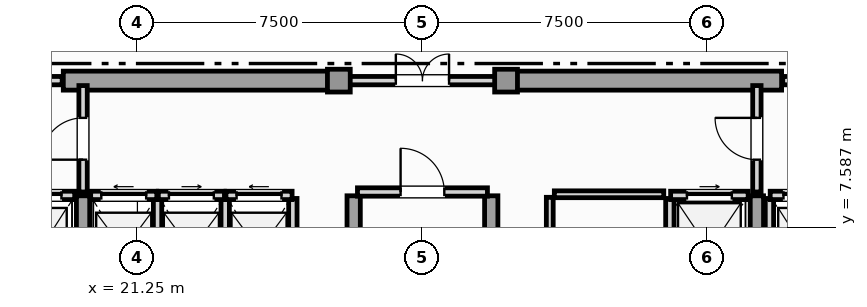
"""IFC4 building model, lengths in metres.
Left out: names, types, materials, properties, quantities, classifications, styles, units other than length and angle.
Written with IfcOpenShell. Run it as: python <this file> out.ifc"""

import sys

from ifc_helpers import new_model, si_unit, direction, frame, frame_2d, origin, origin_2d, place, context, subcontext, project, spatial, rectangle, extrude, element, fill, save


model = new_model("IFC4")
c1 = context("Model", 3, precision=1e-05, world=origin(), true_north=direction((0.0, 1.0)))
c2 = subcontext(c1, "Body", "Model", "MODEL_VIEW")
j1 = project(units=[si_unit("LENGTHUNIT", "METRE"), si_unit("PLANEANGLEUNIT", "RADIAN")], contexts=[c1])
p1 = place(None, origin())
s1 = spatial("IfcSite", under=j1, at=p1, CompositionType="ELEMENT")
p2 = place(p1, origin())
s2 = spatial("IfcBuilding", under=s1, at=p2, CompositionType="ELEMENT")
p3 = place(p2, frame((0.0, 0.0, 313.05)))
s3 = spatial("IfcBuildingStorey", under=s2, at=p3, CompositionType="ELEMENT", Elevation=313.05)
for number, where, z_axis, x_axis in (
    (1, (19.3, 11.45, 0.0), (0.0, 0.0, 1.0), (1.0, 0.0, 0.0)),
    (2, (30.9, 11.45, 0.0), (0.0, 0.0, 1.0), (1.0, 0.0, 0.0)),
):
    element("IfcWall", number, at=place(p3, frame(where, z_axis=z_axis, x_axis=x_axis)), inside=s3, PredefinedType="SHEAR", context=c2, shape_type="SweptSolid", body=[
        extrude(rectangle(XDim=7.3, YDim=0.5, at=frame_2d((3.65, 0.0))), origin(), (0.0, 0.0, 1.0), 3.65),
    ])
for number, where, z_axis, x_axis in (
    (3, (19.82, 0.92, 0.0), (0.0, 0.0, 1.0), (0.0, 1.0, 0.0)),
    (4, (26.94, 0.92, 0.0), (0.0, 0.0, 1.0), (0.0, 1.0, 0.0)),
    (5, (30.56, 0.92, 0.0), (0.0, 0.0, 1.0), (0.0, 1.0, 0.0)),
    (6, (37.55, 0.92, 0.0), (0.0, 0.0, 1.0), (0.0, 1.0, 0.0)),
):
    element("IfcWall", number, at=place(p3, frame(where, z_axis=z_axis, x_axis=x_axis)), inside=s3, PredefinedType="SHEAR", context=c2, shape_type="SweptSolid", body=[
        extrude(rectangle(XDim=7.5, YDim=0.35, at=frame_2d((3.75, 0.0))), origin(), (0.0, 0.0, 1.0), 3.65),
    ])
for number, where, z_axis, x_axis in (
    (7, (26.55, 11.45, 0.0), (0.0, 0.0, 1.0), (1.0, 0.0, 0.0)),
    (8, (30.95, 11.45, 0.0), (0.0, 0.0, 1.0), (1.0, 0.0, 0.0)),
):
    element("IfcColumn", number, at=place(p3, frame(where, z_axis=z_axis, x_axis=x_axis)), inside=s3, PredefinedType="COLUMN", context=c2, shape_type="SweptSolid", body=[
        extrude(rectangle(XDim=0.6, YDim=0.6, at=origin_2d()), origin(), (0.0, 0.0, 1.0), 3.85),
    ])
p4 = place(p3, frame((17.78, 8.43, 0.0), z_axis=(0.0, 0.0, 1.0), x_axis=(1.0, 0.0, 0.0)))
e9 = element("IfcWall", 9, at=p4, inside=s3, PredefinedType="SOLIDWALL", context=c2, shape_type="SweptSolid", body=[
    extrude(rectangle(XDim=1.82, YDim=0.22, at=frame_2d((0.91, 0.0))), origin(), (0.0, 0.0, 1.0), 3.65),
])
p5 = place(p4, frame((0.35, 0.0, 0.0)))
e10 = element("IfcOpeningElement", 10, at=p5, cuts=e9, PredefinedType="OPENING", context=c2, shape_type="SweptSolid", body=[
    extrude(rectangle(XDim=1.12, YDim=2.25, at=frame_2d((0.56, 1.125))), frame((0.0, 0.12, 0.0), z_axis=(0.0, -1.0, 0.0), x_axis=(1.0, 0.0, 0.0)), (0.0, 0.0, 1.0), 0.24),
])
p6 = place(p3, frame((37.88, 5.65, 0.0), z_axis=(0.0, 0.0, 1.0), x_axis=(0.0, 1.0, 0.0)))
e11 = element("IfcWall", 11, at=p6, inside=s3, PredefinedType="SOLIDWALL", context=c2, shape_type="SweptSolid", body=[
    extrude(rectangle(XDim=2.7, YDim=0.22, at=frame_2d((1.35, 0.0))), origin(), (0.0, 0.0, 1.0), 3.65),
])
p7 = place(p3, frame((37.9, 8.43, 0.0), z_axis=(0.0, 0.0, 1.0), x_axis=(1.0, 0.0, 0.0)))
e12 = element("IfcWall", 12, at=p7, inside=s3, PredefinedType="SOLIDWALL", context=c2, shape_type="SweptSolid", body=[
    extrude(rectangle(XDim=1.82, YDim=0.22, at=frame_2d((0.91, 0.0))), origin(), (0.0, 0.0, 1.0), 3.65),
])
p8 = place(p7, frame((0.35, 0.0, 0.0)))
e13 = element("IfcOpeningElement", 13, at=p8, cuts=e12, PredefinedType="OPENING", context=c2, shape_type="SweptSolid", body=[
    extrude(rectangle(XDim=1.12, YDim=2.25, at=frame_2d((0.56, 1.125))), frame((0.0, 0.12, 0.0), z_axis=(0.0, -1.0, 0.0), x_axis=(1.0, 0.0, 0.0)), (0.0, 0.0, 1.0), 0.24),
])
p9 = place(p3, frame((35.26, 5.65, 0.0), z_axis=(0.0, 0.0, 1.0), x_axis=(0.0, 1.0, 0.0)))
e14 = element("IfcWall", 14, at=p9, inside=s3, PredefinedType="SOLIDWALL", context=c2, shape_type="SweptSolid", body=[
    extrude(rectangle(XDim=2.7, YDim=0.22, at=frame_2d((1.35, 0.0))), origin(), (0.0, 0.0, 1.0), 3.65),
])
p10 = place(p3, frame((35.28, 8.43, 0.0), z_axis=(0.0, 0.0, 1.0), x_axis=(1.0, 0.0, 0.0)))
e15 = element("IfcWall", 15, at=p10, inside=s3, PredefinedType="SOLIDWALL", context=c2, shape_type="SweptSolid", body=[
    extrude(rectangle(XDim=2.04, YDim=0.22, at=frame_2d((1.02, 0.0))), origin(), (0.0, 0.0, 1.0), 3.65),
])
p11 = place(p10, frame((0.43, 0.0, 0.0)))
e16 = element("IfcOpeningElement", 16, at=p11, cuts=e15, PredefinedType="OPENING", context=c2, shape_type="SweptSolid", body=[
    extrude(rectangle(XDim=1.18, YDim=2.2, at=frame_2d((0.59, 1.1))), frame((0.0, 0.12, 0.0), z_axis=(0.0, -1.0, 0.0), x_axis=(1.0, 0.0, 0.0)), (0.0, 0.0, 1.0), 0.24),
])
p12 = place(p3, frame((21.78, 5.65, 0.0), z_axis=(0.0, 0.0, 1.0), x_axis=(0.0, 1.0, 0.0)))
e17 = element("IfcWall", 17, at=p12, inside=s3, PredefinedType="SOLIDWALL", context=c2, shape_type="SweptSolid", body=[
    extrude(rectangle(XDim=2.7, YDim=0.22, at=frame_2d((1.35, 0.0))), origin(), (0.0, 0.0, 1.0), 3.65),
])
p13 = place(p3, frame((20.02, 8.43, 0.0), z_axis=(0.0, 0.0, 1.0), x_axis=(1.0, 0.0, 0.0)))
e18 = element("IfcWall", 18, at=p13, inside=s3, PredefinedType="SOLIDWALL", context=c2, shape_type="SweptSolid", body=[
    extrude(rectangle(XDim=1.74, YDim=0.22, at=frame_2d((0.87, 0.0))), origin(), (0.0, 0.0, 1.0), 3.65),
])
p14 = place(p13, frame((0.28, 0.0, 0.0)))
e19 = element("IfcOpeningElement", 19, at=p14, cuts=e18, PredefinedType="OPENING", context=c2, shape_type="SweptSolid", body=[
    extrude(rectangle(XDim=1.18, YDim=2.2, at=frame_2d((0.59, 1.1))), frame((0.0, 0.12, 0.0), z_axis=(0.0, -1.0, 0.0), x_axis=(1.0, 0.0, 0.0)), (0.0, 0.0, 1.0), 0.24),
])
p15 = place(p3, frame((23.56, 5.65, 0.0), z_axis=(0.0, 0.0, 1.0), x_axis=(0.0, 1.0, 0.0)))
e20 = element("IfcWall", 20, at=p15, inside=s3, PredefinedType="SOLIDWALL", context=c2, shape_type="SweptSolid", body=[
    extrude(rectangle(XDim=2.7, YDim=0.22, at=frame_2d((1.35, 0.0))), origin(), (0.0, 0.0, 1.0), 3.65),
])
p16 = place(p3, frame((21.8, 8.43, 0.0), z_axis=(0.0, 0.0, 1.0), x_axis=(1.0, 0.0, 0.0)))
e21 = element("IfcWall", 21, at=p16, inside=s3, PredefinedType="SOLIDWALL", context=c2, shape_type="SweptSolid", body=[
    extrude(rectangle(XDim=1.74, YDim=0.22, at=frame_2d((0.87, 0.0))), origin(), (0.0, 0.0, 1.0), 3.65),
])
p17 = place(p16, frame((0.28, 0.0, 0.0)))
e22 = element("IfcOpeningElement", 22, at=p17, cuts=e21, PredefinedType="OPENING", context=c2, shape_type="SweptSolid", body=[
    extrude(rectangle(XDim=1.18, YDim=2.2, at=frame_2d((0.59, 1.1))), frame((0.0, 0.12, 0.0), z_axis=(0.0, -1.0, 0.0), x_axis=(1.0, 0.0, 0.0)), (0.0, 0.0, 1.0), 0.24),
])
p18 = place(p3, frame((25.34, 5.65, 0.0), z_axis=(0.0, 0.0, 1.0), x_axis=(0.0, 1.0, 0.0)))
e23 = element("IfcWall", 23, at=p18, inside=s3, PredefinedType="SOLIDWALL", context=c2, shape_type="SweptSolid", body=[
    extrude(rectangle(XDim=2.7, YDim=0.22, at=frame_2d((1.35, 0.0))), origin(), (0.0, 0.0, 1.0), 3.65),
])
p19 = place(p3, frame((23.58, 8.43, 0.0), z_axis=(0.0, 0.0, 1.0), x_axis=(1.0, 0.0, 0.0)))
e24 = element("IfcWall", 24, at=p19, inside=s3, PredefinedType="SOLIDWALL", context=c2, shape_type="SweptSolid", body=[
    extrude(rectangle(XDim=1.74, YDim=0.22, at=frame_2d((0.87, 0.0))), origin(), (0.0, 0.0, 1.0), 3.65),
])
p20 = place(p19, frame((0.28, 0.0, 0.0)))
e25 = element("IfcOpeningElement", 25, at=p20, cuts=e24, PredefinedType="OPENING", context=c2, shape_type="SweptSolid", body=[
    extrude(rectangle(XDim=1.18, YDim=2.2, at=frame_2d((0.59, 1.1))), frame((0.0, 0.12, 0.0), z_axis=(0.0, -1.0, 0.0), x_axis=(1.0, 0.0, 0.0)), (0.0, 0.0, 1.0), 0.24),
])
p21 = place(p3, frame((27.04, 8.52, 0.0), z_axis=(0.0, 0.0, 1.0), x_axis=(1.0, 0.0, 0.0)))
e26 = element("IfcWall", 26, at=p21, inside=s3, PredefinedType="SOLIDWALL", context=c2, shape_type="SweptSolid", body=[
    extrude(rectangle(XDim=3.42, YDim=0.22, at=frame_2d((1.71, 0.0))), origin(), (0.0, 0.0, 1.0), 3.65),
])
p22 = place(p21, frame((1.135, 0.0, 0.0)))
e27 = element("IfcOpeningElement", 27, at=p22, cuts=e26, PredefinedType="OPENING", context=c2, shape_type="SweptSolid", body=[
    extrude(rectangle(XDim=1.15, YDim=2.2, at=frame_2d((0.575, 1.1))), frame((0.0, 0.12, 0.0), z_axis=(0.0, -1.0, 0.0), x_axis=(1.0, 0.0, 0.0)), (0.0, 0.0, 1.0), 0.24),
])
p23 = place(p3, frame((19.82, 8.52, 0.0), z_axis=(0.0, 0.0, 1.0), x_axis=(0.0, 1.0, 0.0)))
e28 = element("IfcWall", 28, at=p23, inside=s3, PredefinedType="SOLIDWALL", context=c2, shape_type="SweptSolid", body=[
    extrude(rectangle(XDim=2.8, YDim=0.22, at=frame_2d((1.4, 0.0))), origin(), (0.0, 0.0, 1.0), 3.105),
])
p24 = place(p23, frame((0.85, 0.0, 0.0)))
e29 = element("IfcOpeningElement", 29, at=p24, cuts=e28, PredefinedType="OPENING", context=c2, shape_type="SweptSolid", body=[
    extrude(rectangle(XDim=1.1, YDim=2.2, at=frame_2d((0.55, 1.1))), frame((0.0, 0.12, 0.0), z_axis=(0.0, -1.0, 0.0), x_axis=(1.0, 0.0, 0.0)), (0.0, 0.0, 1.0), 0.24),
])
p25 = place(p3, frame((37.55, 8.52, 0.0), z_axis=(0.0, 0.0, 1.0), x_axis=(0.0, 1.0, 0.0)))
e30 = element("IfcWall", 30, at=p25, inside=s3, PredefinedType="SOLIDWALL", context=c2, shape_type="SweptSolid", body=[
    extrude(rectangle(XDim=2.8, YDim=0.22, at=frame_2d((1.4, 0.0))), origin(), (0.0, 0.0, 1.0), 3.105),
])
p26 = place(p25, frame((0.85, 0.0, 0.0)))
e31 = element("IfcOpeningElement", 31, at=p26, cuts=e30, PredefinedType="OPENING", context=c2, shape_type="SweptSolid", body=[
    extrude(rectangle(XDim=1.1, YDim=2.2, at=frame_2d((0.55, 1.1))), frame((0.0, 0.12, 0.0), z_axis=(0.0, -1.0, 0.0), x_axis=(1.0, 0.0, 0.0)), (0.0, 0.0, 1.0), 0.24),
])
p27 = place(p3, frame((16.23, 11.45, 0.0), z_axis=(0.0, 0.0, 1.0), x_axis=(1.0, 0.0, 0.0)))
e32 = element("IfcWall", 32, at=p27, inside=s3, PredefinedType="SOLIDWALL", context=c2, shape_type="SweptSolid", body=[
    extrude(rectangle(XDim=3.04, YDim=0.22, at=frame_2d((1.52, 0.0))), origin(), (0.0, 0.0, 1.0), 3.65),
])
p28 = place(p27, frame((0.97, 0.0, 0.0)))
e33 = element("IfcOpeningElement", 33, at=p28, cuts=e32, PredefinedType="OPENING", context=c2, shape_type="SweptSolid", body=[
    extrude(rectangle(XDim=1.1, YDim=2.2, at=frame_2d((0.55, 1.1))), frame((0.0, 0.12, 0.0), z_axis=(0.0, -1.0, 0.0), x_axis=(1.0, 0.0, 0.0)), (0.0, 0.0, 1.0), 0.24),
])
p29 = place(p3, frame((26.63, 11.45, 0.0), z_axis=(0.0, 0.0, 1.0), x_axis=(1.0, 0.0, 0.0)))
e34 = element("IfcWall", 34, at=p29, inside=s3, PredefinedType="SOLIDWALL", context=c2, shape_type="SweptSolid", body=[
    extrude(rectangle(XDim=4.24, YDim=0.22, at=frame_2d((2.12, 0.0))), origin(), (0.0, 0.0, 1.0), 3.65),
])
p30 = place(p29, frame((1.42, 0.0, 0.0)))
e35 = element("IfcOpeningElement", 35, at=p30, cuts=e34, PredefinedType="OPENING", context=c2, shape_type="SweptSolid", body=[
    extrude(rectangle(XDim=1.4, YDim=2.2, at=frame_2d((0.7, 1.1))), frame((0.0, 0.12, 0.0), z_axis=(0.0, -1.0, 0.0), x_axis=(1.0, 0.0, 0.0)), (0.0, 0.0, 1.0), 0.24),
])
p31 = place(p3, frame((38.23, 11.45, 0.0), z_axis=(0.0, 0.0, 1.0), x_axis=(1.0, 0.0, 0.0)))
e36 = element("IfcWall", 36, at=p31, inside=s3, PredefinedType="SOLIDWALL", context=c2, shape_type="SweptSolid", body=[
    extrude(rectangle(XDim=3.04, YDim=0.22, at=frame_2d((1.52, 0.0))), origin(), (0.0, 0.0, 1.0), 3.65),
])
p32 = place(p31, frame((0.97, 0.0, 0.0)))
e37 = element("IfcOpeningElement", 37, at=p32, cuts=e36, PredefinedType="OPENING", context=c2, shape_type="SweptSolid", body=[
    extrude(rectangle(XDim=1.1, YDim=2.2, at=frame_2d((0.55, 1.1))), frame((0.0, 0.12, 0.0), z_axis=(0.0, -1.0, 0.0), x_axis=(1.0, 0.0, 0.0)), (0.0, 0.0, 1.0), 0.24),
])
p33 = place(p3, frame((32.1, 5.65, 0.0), z_axis=(0.0, 0.0, 1.0), x_axis=(0.0, 1.0, 0.0)))
e38 = element("IfcWall", 38, at=p33, inside=s3, PredefinedType="PARTITIONING", context=c2, shape_type="SweptSolid", body=[
    extrude(rectangle(XDim=2.73, YDim=0.18, at=frame_2d((1.365, 0.0))), origin(), (0.0, 0.0, 1.0), 3.65),
])
p34 = place(p33, frame((0.925, 0.0, 0.0)))
e39 = element("IfcOpeningElement", 39, at=p34, cuts=e38, PredefinedType="OPENING", context=c2, shape_type="SweptSolid", body=[
    extrude(rectangle(XDim=0.88, YDim=2.05, at=frame_2d((0.44, 1.025))), frame((0.0, 0.1, 0.0), z_axis=(0.0, -1.0, 0.0), x_axis=(1.0, 0.0, 0.0)), (0.0, 0.0, 1.0), 0.2),
])
p35 = place(p3, frame((32.22, 8.46, 0.0), z_axis=(0.0, 0.0, 1.0), x_axis=(1.0, 0.0, 0.0)))
e40 = element("IfcWall", 40, at=p35, inside=s3, PredefinedType="PARTITIONING", context=c2, shape_type="SweptSolid", body=[
    extrude(rectangle(XDim=2.88, YDim=0.18, at=frame_2d((1.44, 0.0))), origin(), (0.0, 0.0, 1.0), 3.65),
])
p36 = place(p5, origin())
e41 = element("IfcDoor", 41, at=p36, inside=s3, OperationType="SLIDING_TO_RIGHT", PredefinedType="DOOR", context=c2, shape_type="SweptSolid", body=[
    extrude(rectangle(XDim=1.12, YDim=2.25, at=frame_2d((0.56, 1.125))), frame((0.0, 0.025, 0.0), z_axis=(0.0, -1.0, 0.0), x_axis=(1.0, 0.0, 0.0)), (0.0, 0.0, 1.0), 0.05),
])
fill(e10, e41)
p37 = place(p8, origin())
e42 = element("IfcDoor", 42, at=p37, inside=s3, OperationType="SLIDING_TO_LEFT", PredefinedType="DOOR", context=c2, shape_type="SweptSolid", body=[
    extrude(rectangle(XDim=1.12, YDim=2.25, at=frame_2d((0.56, 1.125))), frame((0.0, 0.025, 0.0), z_axis=(0.0, -1.0, 0.0), x_axis=(1.0, 0.0, 0.0)), (0.0, 0.0, 1.0), 0.05),
])
fill(e13, e42)
p38 = place(p11, origin())
e43 = element("IfcDoor", 43, at=p38, inside=s3, OperationType="SLIDING_TO_RIGHT", PredefinedType="DOOR", context=c2, shape_type="SweptSolid", body=[
    extrude(rectangle(XDim=1.18, YDim=2.2, at=frame_2d((0.59, 1.1))), frame((0.0, 0.025, 0.0), z_axis=(0.0, -1.0, 0.0), x_axis=(1.0, 0.0, 0.0)), (0.0, 0.0, 1.0), 0.05),
])
fill(e16, e43)
p39 = place(p14, origin())
e44 = element("IfcDoor", 44, at=p39, inside=s3, OperationType="SLIDING_TO_LEFT", PredefinedType="DOOR", context=c2, shape_type="SweptSolid", body=[
    extrude(rectangle(XDim=1.18, YDim=2.2, at=frame_2d((0.59, 1.1))), frame((0.0, 0.025, 0.0), z_axis=(0.0, -1.0, 0.0), x_axis=(1.0, 0.0, 0.0)), (0.0, 0.0, 1.0), 0.05),
])
fill(e19, e44)
p40 = place(p17, origin())
e45 = element("IfcDoor", 45, at=p40, inside=s3, OperationType="SLIDING_TO_RIGHT", PredefinedType="DOOR", context=c2, shape_type="SweptSolid", body=[
    extrude(rectangle(XDim=1.18, YDim=2.2, at=frame_2d((0.59, 1.1))), frame((0.0, 0.025, 0.0), z_axis=(0.0, -1.0, 0.0), x_axis=(1.0, 0.0, 0.0)), (0.0, 0.0, 1.0), 0.05),
])
fill(e22, e45)
p41 = place(p20, origin())
e46 = element("IfcDoor", 46, at=p41, inside=s3, OperationType="SLIDING_TO_LEFT", PredefinedType="DOOR", context=c2, shape_type="SweptSolid", body=[
    extrude(rectangle(XDim=1.18, YDim=2.2, at=frame_2d((0.59, 1.1))), frame((0.0, 0.025, 0.0), z_axis=(0.0, -1.0, 0.0), x_axis=(1.0, 0.0, 0.0)), (0.0, 0.0, 1.0), 0.05),
])
fill(e25, e46)
p42 = place(p22, origin())
e47 = element("IfcDoor", 47, at=p42, inside=s3, OperationType="SINGLE_SWING_LEFT", PredefinedType="DOOR", context=c2, shape_type="SweptSolid", body=[
    extrude(rectangle(XDim=1.15, YDim=2.2, at=frame_2d((0.575, 1.1))), frame((0.0, 0.025, 0.0), z_axis=(0.0, -1.0, 0.0), x_axis=(1.0, 0.0, 0.0)), (0.0, 0.0, 1.0), 0.05),
])
fill(e27, e47)
p43 = place(p24, origin())
e48 = element("IfcDoor", 48, at=p43, inside=s3, OperationType="SINGLE_SWING_LEFT", PredefinedType="DOOR", context=c2, shape_type="SweptSolid", body=[
    extrude(rectangle(XDim=1.1, YDim=2.2, at=frame_2d((0.55, 1.1))), frame((0.0, 0.025, 0.0), z_axis=(0.0, -1.0, 0.0), x_axis=(1.0, 0.0, 0.0)), (0.0, 0.0, 1.0), 0.05),
])
fill(e29, e48)
p44 = place(p26, origin())
e49 = element("IfcDoor", 49, at=p44, inside=s3, OperationType="SINGLE_SWING_RIGHT", PredefinedType="DOOR", context=c2, shape_type="SweptSolid", body=[
    extrude(rectangle(XDim=1.1, YDim=2.2, at=frame_2d((0.55, 1.1))), frame((0.0, 0.025, 0.0), z_axis=(0.0, -1.0, 0.0), x_axis=(1.0, 0.0, 0.0)), (0.0, 0.0, 1.0), 0.05),
])
fill(e31, e49)
p45 = place(p30, origin())
e50 = element("IfcDoor", 50, at=p45, inside=s3, OperationType="DOUBLE_DOOR_SINGLE_SWING", PredefinedType="DOOR", context=c2, shape_type="SweptSolid", body=[
    extrude(rectangle(XDim=1.4, YDim=2.2, at=frame_2d((0.7, 1.1))), frame((0.0, 0.025, 0.0), z_axis=(0.0, -1.0, 0.0), x_axis=(1.0, 0.0, 0.0)), (0.0, 0.0, 1.0), 0.05),
])
fill(e35, e50)
save(model, sys.argv[1])
